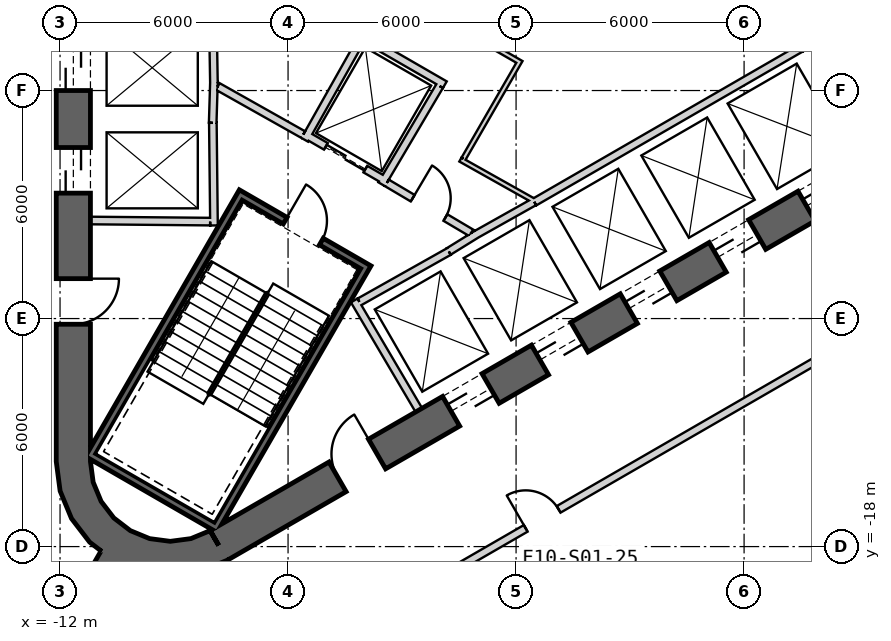
"""IFC4 building model, lengths in metres.
Left out: names, types, materials, properties, quantities, classifications, styles, units other than length and angle.
Written with IfcOpenShell. Run it as: python <this file> out.ifc"""

import sys

from ifc_helpers import new_model, si_unit, direction, frame, frame_2d, origin, place, context, subcontext, project, spatial, polyline, rectangle, outline, extrude, element, fill, save


model = new_model("IFC4")
c1 = context("Model", 3, precision=1e-05, world=origin(), true_north=direction((0.0, 1.0)))
c2 = subcontext(c1, "Body", "Model", "MODEL_VIEW")
j1 = project(units=[si_unit("LENGTHUNIT", "METRE"), si_unit("PLANEANGLEUNIT", "RADIAN")], contexts=[c1])
p1 = place(None, origin())
s1 = spatial("IfcSite", under=j1, at=p1, CompositionType="ELEMENT")
p2 = place(p1, origin())
s2 = spatial("IfcBuilding", under=s1, at=p2, CompositionType="ELEMENT")
p3 = place(p2, frame((0.0, 0.0, 57.8)))
s3 = spatial("IfcBuildingStorey", under=s2, at=p3, CompositionType="ELEMENT", Elevation=57.8)
p4 = place(p3, frame((-11.65, 15.762, 0.0), z_axis=(0.0, 0.0, 1.0), x_axis=(0.0, -1.0, 0.0)))
e1 = element("IfcWall", 1, at=p4, inside=s3, PredefinedType="SHEAR", context=c2, shape_type="SweptSolid", body=[
    extrude(rectangle(XDim=31.523, YDim=0.9, at=frame_2d((15.762, 0.0))), origin(), (0.0, 0.0, 1.0), 4.1),
])
p5 = place(p4, frame((7.062, 0.0, 0.0)))
e2 = element("IfcOpeningElement", 2, at=p5, cuts=e1, PredefinedType="OPENING", context=c2, shape_type="SweptSolid", body=[
    extrude(rectangle(XDim=1.2, YDim=2.4, at=frame_2d((0.6, 1.2))), frame((0.0, 0.46, 0.0), z_axis=(0.0, -1.0, 0.0), x_axis=(1.0, 0.0, 0.0)), (0.0, 0.0, 1.0), 0.92),
])
p6 = place(p4, frame((9.762, 0.0, 0.0)))
e3 = element("IfcOpeningElement", 3, at=p6, cuts=e1, PredefinedType="OPENING", context=c2, shape_type="SweptSolid", body=[
    extrude(rectangle(XDim=1.2, YDim=2.4, at=frame_2d((0.6, 1.2))), frame((0.0, 0.46, 0.0), z_axis=(0.0, -1.0, 0.0), x_axis=(1.0, 0.0, 0.0)), (0.0, 0.0, 1.0), 0.92),
])
p7 = place(p4, frame((12.462, 0.0, 0.0)))
e4 = element("IfcOpeningElement", 4, at=p7, cuts=e1, PredefinedType="OPENING", context=c2, shape_type="SweptSolid", body=[
    extrude(rectangle(XDim=1.2, YDim=2.4, at=frame_2d((0.6, 1.2))), frame((0.0, 0.46, 0.0), z_axis=(0.0, -1.0, 0.0), x_axis=(1.0, 0.0, 0.0)), (0.0, 0.0, 1.0), 0.92),
])
p8 = place(p4, frame((15.162, 0.0, 0.0)))
e5 = element("IfcOpeningElement", 5, at=p8, cuts=e1, PredefinedType="OPENING", context=c2, shape_type="SweptSolid", body=[
    extrude(rectangle(XDim=1.2, YDim=2.4, at=frame_2d((0.6, 1.2))), frame((0.0, 0.46, 0.0), z_axis=(0.0, -1.0, 0.0), x_axis=(1.0, 0.0, 0.0)), (0.0, 0.0, 1.0), 0.92),
])
p9 = place(p4, frame((17.862, 0.0, 0.0)))
e6 = element("IfcOpeningElement", 6, at=p9, cuts=e1, PredefinedType="OPENING", context=c2, shape_type="SweptSolid", body=[
    extrude(rectangle(XDim=1.2, YDim=2.4, at=frame_2d((0.6, 1.2))), frame((0.0, 0.46, 0.0), z_axis=(0.0, -1.0, 0.0), x_axis=(1.0, 0.0, 0.0)), (0.0, 0.0, 1.0), 0.92),
])
p10 = place(p4, frame((20.562, 0.0, 0.0)))
e7 = element("IfcOpeningElement", 7, at=p10, cuts=e1, PredefinedType="OPENING", context=c2, shape_type="SweptSolid", body=[
    extrude(rectangle(XDim=1.2, YDim=2.4, at=frame_2d((0.6, 1.2))), frame((0.0, 0.46, 0.0), z_axis=(0.0, -1.0, 0.0), x_axis=(1.0, 0.0, 0.0)), (0.0, 0.0, 1.0), 0.92),
])
p11 = place(p4, frame((23.262, 0.0, 0.0)))
e8 = element("IfcOpeningElement", 8, at=p11, cuts=e1, PredefinedType="OPENING", context=c2, shape_type="SweptSolid", body=[
    extrude(rectangle(XDim=1.2, YDim=2.4, at=frame_2d((0.6, 1.2))), frame((0.0, 0.46, 0.0), z_axis=(0.0, -1.0, 0.0), x_axis=(1.0, 0.0, 0.0)), (0.0, 0.0, 1.0), 0.92),
])
p12 = place(p4, frame((3.612, 0.0, 0.0)))
e9 = element("IfcOpeningElement", 9, at=p12, cuts=e1, PredefinedType="OPENING", context=c2, shape_type="SweptSolid", body=[
    extrude(rectangle(XDim=1.2, YDim=2.4, at=frame_2d((0.6, 1.2))), frame((0.0, 0.46, 0.0), z_axis=(0.0, -1.0, 0.0), x_axis=(1.0, 0.0, 0.0)), (0.0, 0.0, 1.0), 0.92),
])
p13 = place(p4, frame((26.712, 0.0, 0.0)))
e10 = element("IfcOpeningElement", 10, at=p13, cuts=e1, PredefinedType="OPENING", context=c2, shape_type="SweptSolid", body=[
    extrude(rectangle(XDim=1.2, YDim=2.4, at=frame_2d((0.6, 1.2))), frame((0.0, 0.46, 0.0), z_axis=(0.0, -1.0, 0.0), x_axis=(1.0, 0.0, 0.0)), (0.0, 0.0, 1.0), 0.92),
])
p14 = place(p3, frame((-7.825, -17.97, 0.0), z_axis=(0.0, 0.0, 1.0), x_axis=(0.866028369851, 0.499994862586, 0.0)))
e11 = element("IfcWall", 11, at=p14, inside=s3, PredefinedType="SHEAR", context=c2, shape_type="SweptSolid", body=[
    extrude(rectangle(XDim=31.523, YDim=0.9, at=frame_2d((15.762, 0.0))), origin(), (0.0, 0.0, 1.0), 4.1),
])
p15 = place(p14, frame((7.062, 0.0, 0.0)))
e12 = element("IfcOpeningElement", 12, at=p15, cuts=e11, PredefinedType="OPENING", context=c2, shape_type="SweptSolid", body=[
    extrude(rectangle(XDim=1.2, YDim=2.4, at=frame_2d((0.6, 1.2))), frame((0.0, 0.46, 0.0), z_axis=(0.0, -1.0, 0.0), x_axis=(1.0, 0.0, 0.0)), (0.0, 0.0, 1.0), 0.92),
])
p16 = place(p14, frame((9.762, 0.0, 0.0)))
e13 = element("IfcOpeningElement", 13, at=p16, cuts=e11, PredefinedType="OPENING", context=c2, shape_type="SweptSolid", body=[
    extrude(rectangle(XDim=1.2, YDim=2.4, at=frame_2d((0.6, 1.2))), frame((0.0, 0.46, 0.0), z_axis=(0.0, -1.0, 0.0), x_axis=(1.0, 0.0, 0.0)), (0.0, 0.0, 1.0), 0.92),
])
p17 = place(p14, frame((12.462, 0.0, 0.0)))
e14 = element("IfcOpeningElement", 14, at=p17, cuts=e11, PredefinedType="OPENING", context=c2, shape_type="SweptSolid", body=[
    extrude(rectangle(XDim=1.2, YDim=2.4, at=frame_2d((0.6, 1.2))), frame((0.0, 0.46, 0.0), z_axis=(0.0, -1.0, 0.0), x_axis=(1.0, 0.0, 0.0)), (0.0, 0.0, 1.0), 0.92),
])
p18 = place(p14, frame((15.162, 0.0, 0.0)))
e15 = element("IfcOpeningElement", 15, at=p18, cuts=e11, PredefinedType="OPENING", context=c2, shape_type="SweptSolid", body=[
    extrude(rectangle(XDim=1.2, YDim=2.4, at=frame_2d((0.6, 1.2))), frame((0.0, 0.46, 0.0), z_axis=(0.0, -1.0, 0.0), x_axis=(1.0, 0.0, 0.0)), (0.0, 0.0, 1.0), 0.92),
])
p19 = place(p14, frame((17.862, 0.0, 0.0)))
e16 = element("IfcOpeningElement", 16, at=p19, cuts=e11, PredefinedType="OPENING", context=c2, shape_type="SweptSolid", body=[
    extrude(rectangle(XDim=1.2, YDim=2.4, at=frame_2d((0.6, 1.2))), frame((0.0, 0.46, 0.0), z_axis=(0.0, -1.0, 0.0), x_axis=(1.0, 0.0, 0.0)), (0.0, 0.0, 1.0), 0.92),
])
p20 = place(p14, frame((20.562, 0.0, 0.0)))
e17 = element("IfcOpeningElement", 17, at=p20, cuts=e11, PredefinedType="OPENING", context=c2, shape_type="SweptSolid", body=[
    extrude(rectangle(XDim=1.2, YDim=2.4, at=frame_2d((0.6, 1.2))), frame((0.0, 0.46, 0.0), z_axis=(0.0, -1.0, 0.0), x_axis=(1.0, 0.0, 0.0)), (0.0, 0.0, 1.0), 0.92),
])
p21 = place(p14, frame((26.712, 0.0, 0.0)))
e18 = element("IfcOpeningElement", 18, at=p21, cuts=e11, PredefinedType="OPENING", context=c2, shape_type="SweptSolid", body=[
    extrude(rectangle(XDim=1.2, YDim=2.4, at=frame_2d((0.6, 1.2))), frame((0.0, 0.46, 0.0), z_axis=(0.0, -1.0, 0.0), x_axis=(1.0, 0.0, 0.0)), (0.0, 0.0, 1.0), 0.92),
])
p22 = place(p14, frame((3.612, 0.0, 0.0)))
e19 = element("IfcOpeningElement", 19, at=p22, cuts=e11, PredefinedType="OPENING", context=c2, shape_type="SweptSolid", body=[
    extrude(rectangle(XDim=1.2, YDim=2.4, at=frame_2d((0.6, 1.2))), frame((0.0, 0.46, 0.0), z_axis=(0.0, -1.0, 0.0), x_axis=(1.0, 0.0, 0.0)), (0.0, 0.0, 1.0), 0.92),
])
p23 = place(p3, origin())
e20 = element("IfcWall", 20, at=p23, inside=s3, PredefinedType="SHEAR", context=c2, shape_type="SweptSolid", body=[
    extrude(outline(polyline([(-12.1, -15.762), (-11.998, -16.538), (-11.698, -17.262), (-11.221, -17.883), (-10.6, -18.36), (-9.876, -18.659), (-9.1, -18.762), (-8.323, -18.659), (-7.6, -18.36), (-8.05, -17.58), (-8.556, -17.79), (-9.1, -17.862), (-9.644, -17.79), (-10.15, -17.58), (-10.585, -17.247), (-10.919, -16.812), (-11.128, -16.305), (-11.2, -15.762), (-12.1, -15.762)])), origin(), (0.0, 0.0, 1.0), 4.1),
])
p24 = place(p3, frame((-10.575, -18.316, 0.0), z_axis=(0.0, 0.0, 1.0), x_axis=(-0.500001010139, -0.866024820579, 0.0)))
e21 = element("IfcWall", 21, at=p24, inside=s3, PredefinedType="SHEAR", context=c2, shape_type="SweptSolid", body=[
    extrude(rectangle(XDim=13.884, YDim=0.8, at=frame_2d((6.942, 0.0))), origin(), (0.0, 0.0, 1.0), 4.1),
])
p25 = place(p24, frame((1.2, 0.0, 0.0)))
e22 = element("IfcOpeningElement", 22, at=p25, cuts=e21, PredefinedType="OPENING", context=c2, shape_type="SweptSolid", body=[
    extrude(rectangle(XDim=1.4, YDim=2.4, at=frame_2d((0.7, 1.2))), frame((0.0, 0.41, 0.0), z_axis=(0.0, -1.0, 0.0), x_axis=(1.0, 0.0, 0.0)), (0.0, 0.0, 1.0), 0.82),
])
p26 = place(p3, frame((-7.95, -5.772, 0.0), z_axis=(0.0, 0.0, 1.0), x_axis=(-0.030803413295, -0.999525462272, 0.0)))
e23 = element("IfcWall", 23, at=p26, inside=s3, PredefinedType="PLUMBINGWALL", context=c2, shape_type="SweptSolid", body=[
    extrude(rectangle(XDim=1.078, YDim=0.2, at=frame_2d((0.539, 0.0))), origin(), (0.0, 0.0, 1.0), 3.8),
])
p27 = place(p3, frame((-7.98, -4.05, 0.0), z_axis=(0.0, 0.0, 1.0), x_axis=(0.016809909365, -0.999858703491, 0.0)))
e24 = element("IfcWall", 24, at=p27, inside=s3, PredefinedType="PLUMBINGWALL", context=c2, shape_type="SweptSolid", body=[
    extrude(rectangle(XDim=1.844, YDim=0.2, at=frame_2d((0.922, 0.0))), origin(), (0.0, 0.0, 1.0), 3.8),
])
p28 = place(p3, frame((-7.979, -6.85, 0.0), z_axis=(0.0, 0.0, 1.0), x_axis=(0.011121475088, -0.999938154483, 0.0)))
e25 = element("IfcWall", 25, at=p28, inside=s3, PredefinedType="PLUMBINGWALL", context=c2, shape_type="SweptSolid", body=[
    extrude(rectangle(XDim=2.7, YDim=0.2, at=frame_2d((1.35, 0.0))), origin(), (0.0, 0.0, 1.0), 3.8),
])
p29 = place(p3, frame((-8.05, -9.449, 0.0), z_axis=(0.0, 0.0, 1.0), x_axis=(-0.999957467379, 0.009222983926, 0.0)))
e26 = element("IfcWall", 26, at=p29, inside=s3, PredefinedType="PLUMBINGWALL", context=c2, shape_type="SweptSolid", body=[
    extrude(rectangle(XDim=3.15, YDim=0.2, at=frame_2d((1.575, 0.0))), origin(), (0.0, 0.0, 1.0), 3.8),
])
p30 = place(p3, frame((0.483, -8.936, 0.0), z_axis=(0.0, 0.0, 1.0), x_axis=(0.866030989016, 0.499990325971, 0.0)))
e27 = element("IfcWall", 27, at=p30, inside=s3, PredefinedType="PLUMBINGWALL", context=c2, shape_type="SweptSolid", body=[
    extrude(rectangle(XDim=8.1, YDim=0.2, at=frame_2d((4.05, 0.0))), origin(), (0.0, 0.0, 1.0), 3.8),
])
p31 = place(p3, frame((-2.558, -14.409, 0.0), z_axis=(0.0, 0.0, 1.0), x_axis=(-0.507997497166, 0.861358544901, 0.0)))
e28 = element("IfcWall", 28, at=p31, inside=s3, PredefinedType="PLUMBINGWALL", context=c2, shape_type="SweptSolid", body=[
    extrude(rectangle(XDim=3.35, YDim=0.2, at=frame_2d((1.675, 0.0))), origin(), (0.0, 0.0, 1.0), 3.8),
])
p32 = place(p3, frame((-1.769, -10.237, 0.0), z_axis=(0.0, 0.0, 1.0), x_axis=(-0.871534483978, -0.490334215854, 0.0)))
e29 = element("IfcWall", 29, at=p32, inside=s3, PredefinedType="PLUMBINGWALL", context=c2, shape_type="SweptSolid", body=[
    extrude(rectangle(XDim=2.7, YDim=0.2, at=frame_2d((1.35, 0.0))), origin(), (0.0, 0.0, 1.0), 3.8),
])
p33 = place(p3, frame((-1.024, -9.771, 0.0), z_axis=(0.0, 0.0, 1.0), x_axis=(-0.850348075135, -0.526220629693, 0.0)))
e30 = element("IfcWall", 30, at=p33, inside=s3, PredefinedType="PLUMBINGWALL", context=c2, shape_type="SweptSolid", body=[
    extrude(rectangle(XDim=0.878, YDim=0.2, at=frame_2d((0.439, 0.0))), origin(), (0.0, 0.0, 1.0), 3.8),
])
p34 = place(p3, frame((-1.13, -9.832, 0.0), z_axis=(0.0, 0.0, 1.0), x_axis=(0.871988740738, 0.489525929882, 0.0)))
e31 = element("IfcWall", 31, at=p34, inside=s3, PredefinedType="PLUMBINGWALL", context=c2, shape_type="SweptSolid", body=[
    extrude(rectangle(XDim=1.845, YDim=0.2, at=frame_2d((0.922, 0.0))), origin(), (0.0, 0.0, 1.0), 3.8),
])
p35 = place(p3, frame((-3.905, -10.563, -0.3), z_axis=(0.0, 0.0, 1.0), x_axis=(-0.500012932018, -0.866017937352, 0.0)))
e32 = element("IfcWall", 32, at=p35, inside=s3, PredefinedType="SHEAR", context=c2, shape_type="SweptSolid", body=[
    extrude(rectangle(XDim=8.1, YDim=0.2, at=frame_2d((4.05, 0.0))), origin(), (0.0, 0.0, 1.0), 4.1),
])
p36 = place(p3, frame((-11.282, -15.541, -0.3), z_axis=(0.0, 0.0, 1.0), x_axis=(0.866000483506, -0.500043160704, 0.0)))
e33 = element("IfcWall", 33, at=p36, inside=s3, PredefinedType="SHEAR", context=c2, shape_type="SweptSolid", body=[
    extrude(rectangle(XDim=3.8, YDim=0.2, at=frame_2d((1.9, 0.0))), origin(), (0.0, 0.0, 1.0), 4.1),
])
p37 = place(p3, frame((-7.196, -8.663, -0.3), z_axis=(0.0, 0.0, 1.0), x_axis=(-0.499997992926, -0.866026562566, 0.0)))
e34 = element("IfcWall", 34, at=p37, inside=s3, PredefinedType="SHEAR", context=c2, shape_type="SweptSolid", body=[
    extrude(rectangle(XDim=7.9, YDim=0.2, at=frame_2d((3.95, 0.0))), origin(), (0.0, 0.0, 1.0), 4.1),
])
p38 = place(p3, frame((-4.041, -10.599, -0.3), z_axis=(0.0, 0.0, 1.0), x_axis=(-0.866047807691, 0.499961193289, 0.0)))
e35 = element("IfcWall", 35, at=p38, inside=s3, PredefinedType="SHEAR", context=c2, shape_type="SweptSolid", body=[
    extrude(rectangle(XDim=3.6, YDim=0.2, at=frame_2d((1.8, 0.0))), origin(), (0.0, 0.0, 1.0), 4.1),
])
p39 = place(p38, frame((1.25, 0.0, 0.3)))
e36 = element("IfcOpeningElement", 36, at=p39, cuts=e35, PredefinedType="OPENING", context=c2, shape_type="SweptSolid", body=[
    extrude(rectangle(XDim=1.1, YDim=2.1, at=frame_2d((0.55, 1.05))), frame((0.0, 0.11, 0.0), z_axis=(0.0, -1.0, 0.0), x_axis=(1.0, 0.0, 0.0)), (0.0, 0.0, 1.0), 0.22),
])
p40 = place(p3, frame((-3.446, -8.368, 0.0), z_axis=(0.0, 0.0, 1.0), x_axis=(-0.866024647952, 0.500001309137, 0.0)))
e37 = element("IfcWall", 37, at=p40, inside=s3, PredefinedType="PLUMBINGWALL", context=c2, shape_type="SweptSolid", body=[
    extrude(rectangle(XDim=2.4, YDim=0.2, at=frame_2d((1.2, 0.0))), origin(), (0.0, 0.0, 1.0), 3.8),
])
p41 = place(p40, frame((0.6, 0.0, 0.0)))
e38 = element("IfcOpeningElement", 38, at=p41, cuts=e37, PredefinedType="OPENING", context=c2, shape_type="SweptSolid", body=[
    extrude(rectangle(XDim=1.2, YDim=2.4, at=frame_2d((0.6, 1.2))), frame((0.0, 0.11, 0.0), z_axis=(0.0, -1.0, 0.0), x_axis=(1.0, 0.0, 0.0)), (0.0, 0.0, 1.0), 0.22),
])
p42 = place(p3, frame((-5.562, -7.296, 0.0), z_axis=(0.0, 0.0, 1.0), x_axis=(0.491322718731, 0.870977603649, 0.0)))
e39 = element("IfcWall", 39, at=p42, inside=s3, PredefinedType="PLUMBINGWALL", context=c2, shape_type="SweptSolid", body=[
    extrude(rectangle(XDim=3.1, YDim=0.2, at=frame_2d((1.55, 0.0))), origin(), (0.0, 0.0, 1.0), 3.8),
])
p43 = place(p3, frame((-4.021, -4.606, 0.0), z_axis=(0.0, 0.0, 1.0), x_axis=(0.866016689309, -0.500015093611, 0.0)))
e40 = element("IfcWall", 40, at=p43, inside=s3, PredefinedType="PLUMBINGWALL", context=c2, shape_type="SweptSolid", body=[
    extrude(rectangle(XDim=2.479, YDim=0.2, at=frame_2d((1.24, 0.0))), origin(), (0.0, 0.0, 1.0), 3.8),
])
p44 = place(p3, frame((-2.012, -5.882, 0.0), z_axis=(0.0, 0.0, 1.0), x_axis=(-0.508619639323, -0.860991325447, 0.0)))
e41 = element("IfcWall", 41, at=p44, inside=s3, PredefinedType="PLUMBINGWALL", context=c2, shape_type="SweptSolid", body=[
    extrude(rectangle(XDim=3.0, YDim=0.2, at=frame_2d((1.5, 0.0))), origin(), (0.0, 0.0, 1.0), 3.8),
])
p45 = place(p3, frame((-7.849, -5.894, 0.0), z_axis=(0.0, 0.0, 1.0), x_axis=(0.871340486379, -0.490678873396, 0.0)))
e42 = element("IfcWall", 42, at=p45, inside=s3, PredefinedType="PARTITIONING", context=c2, shape_type="SweptSolid", body=[
    extrude(rectangle(XDim=2.581, YDim=0.2, at=frame_2d((1.291, 0.0))), origin(), (0.0, 0.0, 1.0), 3.8),
])
p46 = place(p3, frame((-3.401, -8.43, 0.0), z_axis=(0.0, 0.0, 1.0), x_axis=(0.860598681535, -0.509283721849, 0.0)))
e43 = element("IfcWall", 43, at=p46, inside=s3, PredefinedType="PARTITIONING", context=c2, shape_type="SweptSolid", body=[
    extrude(rectangle(XDim=2.581, YDim=0.2, at=frame_2d((1.291, 0.0))), origin(), (0.0, 0.0, 1.0), 3.8),
])
p47 = place(p46, frame((0.791, 0.0, 0.0)))
e44 = element("IfcOpeningElement", 44, at=p47, cuts=e43, PredefinedType="OPENING", context=c2, shape_type="SweptSolid", body=[
    extrude(rectangle(XDim=1.0, YDim=2.1, at=frame_2d((0.5, 1.05))), frame((0.0, 0.11, 0.0), z_axis=(0.0, -1.0, 0.0), x_axis=(1.0, 0.0, 0.0)), (0.0, 0.0, 1.0), 0.22),
])
p48 = place(p3, frame((-1.464, -7.816, 0.0), z_axis=(0.0, 0.0, 1.0), x_axis=(0.871880202732, -0.489719217597, 0.0)))
e45 = element("IfcWall", 45, at=p48, inside=s3, PredefinedType="PARTITIONING", context=c2, shape_type="SweptSolid", body=[
    extrude(rectangle(XDim=2.224, YDim=0.12, at=frame_2d((1.112, 0.0))), origin(), (0.0, 0.0, 1.0), 3.8),
])
p49 = place(p3, frame((0.118, -5.195, 0.0), z_axis=(0.0, 0.0, 1.0), x_axis=(-0.499990139034, -0.866031096941, 0.0)))
e46 = element("IfcWall", 46, at=p49, inside=s3, PredefinedType="PARTITIONING", context=c2, shape_type="SweptSolid", body=[
    extrude(rectangle(XDim=3.0, YDim=0.12, at=frame_2d((1.5, 0.0))), origin(), (0.0, 0.0, 1.0), 3.8),
])
p50 = place(p3, frame((-1.371, -4.405, 0.0), z_axis=(0.0, 0.0, 1.0), x_axis=(0.866053003207, -0.499952193351, 0.0)))
e47 = element("IfcWall", 47, at=p50, inside=s3, PredefinedType="PARTITIONING", context=c2, shape_type="SweptSolid", body=[
    extrude(rectangle(XDim=1.625, YDim=0.12, at=frame_2d((0.812, 0.0))), origin(), (0.0, 0.0, 1.0), 3.8),
])
p51 = place(p3, frame((-6.644, -21.503, 0.0), z_axis=(0.0, 0.0, 1.0), x_axis=(0.866025615729, 0.499999632902, 0.0)))
e48 = element("IfcWall", 48, at=p51, inside=s3, PredefinedType="PARTITIONING", context=c2, shape_type="SweptSolid", body=[
    extrude(rectangle(XDim=32.811, YDim=0.2, at=frame_2d((16.405, 0.0))), origin(), (0.0, 0.0, 1.0), 2.98),
])
p52 = place(p51, frame((24.32, 0.0, 0.0)))
e49 = element("IfcOpeningElement", 49, at=p52, cuts=e48, PredefinedType="OPENING", context=c2, shape_type="SweptSolid", body=[
    extrude(rectangle(XDim=1.0, YDim=2.1, at=frame_2d((0.5, 1.05))), frame((0.0, 0.11, 0.0), z_axis=(0.0, -1.0, 0.0), x_axis=(1.0, 0.0, 0.0)), (0.0, 0.0, 1.0), 0.22),
])
p53 = place(p51, frame((7.965, 0.0, 0.0)))
e50 = element("IfcOpeningElement", 50, at=p53, cuts=e48, PredefinedType="OPENING", context=c2, shape_type="SweptSolid", body=[
    extrude(rectangle(XDim=1.0, YDim=2.1, at=frame_2d((0.5, 1.05))), frame((0.0, 0.11, 0.0), z_axis=(0.0, -1.0, 0.0), x_axis=(1.0, 0.0, 0.0)), (0.0, 0.0, 1.0), 0.22),
])
p54 = place(p39, origin())
e51 = element("IfcDoor", 51, at=p54, inside=s3, OperationType="SINGLE_SWING_RIGHT", PredefinedType="USERDEFINED", context=c2, shape_type="SweptSolid", body=[
    extrude(rectangle(XDim=1.1, YDim=2.1, at=frame_2d((0.55, 1.05))), frame((0.0, 0.025, 0.0), z_axis=(0.0, -1.0, 0.0), x_axis=(1.0, 0.0, 0.0)), (0.0, 0.0, 1.0), 0.05),
])
fill(e36, e51)
p55 = place(p47, origin())
e52 = element("IfcDoor", 52, at=p55, inside=s3, OperationType="SINGLE_SWING_LEFT", PredefinedType="USERDEFINED", context=c2, shape_type="SweptSolid", body=[
    extrude(rectangle(XDim=1.0, YDim=2.1, at=frame_2d((0.5, 1.05))), frame((0.0, 0.025, 0.0), z_axis=(0.0, -1.0, 0.0), x_axis=(1.0, 0.0, 0.0)), (0.0, 0.0, 1.0), 0.05),
])
fill(e44, e52)
p56 = place(p41, origin())
e53 = element("IfcDoor", 53, at=p56, inside=s3, OperationType="SLIDING_TO_LEFT", PredefinedType="USERDEFINED", context=c2, shape_type="SweptSolid", body=[
    extrude(rectangle(XDim=1.2, YDim=2.4, at=frame_2d((0.6, 1.2))), frame((0.0, 0.025, 0.0), z_axis=(0.0, -1.0, 0.0), x_axis=(1.0, 0.0, 0.0)), (0.0, 0.0, 1.0), 0.05),
])
fill(e38, e53)
p57 = place(p53, origin())
e54 = element("IfcDoor", 54, at=p57, inside=s3, OperationType="SINGLE_SWING_LEFT", PredefinedType="USERDEFINED", context=c2, shape_type="SweptSolid", body=[
    extrude(rectangle(XDim=1.0, YDim=2.1, at=frame_2d((0.5, 1.05))), frame((0.0, 0.025, 0.0), z_axis=(0.0, -1.0, 0.0), x_axis=(1.0, 0.0, 0.0)), (0.0, 0.0, 1.0), 0.05),
])
fill(e50, e54)
p58 = place(p10, origin())
e55 = element("IfcDoor", 55, at=p58, inside=s3, OperationType="SLIDING_TO_LEFT", PredefinedType="USERDEFINED", context=c2, shape_type="SweptSolid", body=[
    extrude(rectangle(XDim=1.2, YDim=2.4, at=frame_2d((0.6, 1.2))), frame((0.0, 0.025, 0.0), z_axis=(0.0, -1.0, 0.0), x_axis=(1.0, 0.0, 0.0)), (0.0, 0.0, 1.0), 0.05),
])
fill(e7, e55)
p59 = place(p11, origin())
e56 = element("IfcDoor", 56, at=p59, inside=s3, OperationType="SLIDING_TO_LEFT", PredefinedType="USERDEFINED", context=c2, shape_type="SweptSolid", body=[
    extrude(rectangle(XDim=1.2, YDim=2.4, at=frame_2d((0.6, 1.2))), frame((0.0, 0.025, 0.0), z_axis=(0.0, -1.0, 0.0), x_axis=(1.0, 0.0, 0.0)), (0.0, 0.0, 1.0), 0.05),
])
fill(e8, e56)
p60 = place(p15, origin())
e57 = element("IfcDoor", 57, at=p60, inside=s3, OperationType="SLIDING_TO_LEFT", PredefinedType="USERDEFINED", context=c2, shape_type="SweptSolid", body=[
    extrude(rectangle(XDim=1.2, YDim=2.4, at=frame_2d((0.6, 1.2))), frame((0.0, 0.025, 0.0), z_axis=(0.0, -1.0, 0.0), x_axis=(1.0, 0.0, 0.0)), (0.0, 0.0, 1.0), 0.05),
])
fill(e12, e57)
p61 = place(p16, origin())
e58 = element("IfcDoor", 58, at=p61, inside=s3, OperationType="SLIDING_TO_LEFT", PredefinedType="USERDEFINED", context=c2, shape_type="SweptSolid", body=[
    extrude(rectangle(XDim=1.2, YDim=2.4, at=frame_2d((0.6, 1.2))), frame((0.0, 0.025, 0.0), z_axis=(0.0, -1.0, 0.0), x_axis=(1.0, 0.0, 0.0)), (0.0, 0.0, 1.0), 0.05),
])
fill(e13, e58)
p62 = place(p17, origin())
e59 = element("IfcDoor", 59, at=p62, inside=s3, OperationType="SLIDING_TO_LEFT", PredefinedType="USERDEFINED", context=c2, shape_type="SweptSolid", body=[
    extrude(rectangle(XDim=1.2, YDim=2.4, at=frame_2d((0.6, 1.2))), frame((0.0, 0.025, 0.0), z_axis=(0.0, -1.0, 0.0), x_axis=(1.0, 0.0, 0.0)), (0.0, 0.0, 1.0), 0.05),
])
fill(e14, e59)
p63 = place(p18, origin())
e60 = element("IfcDoor", 60, at=p63, inside=s3, OperationType="SLIDING_TO_LEFT", PredefinedType="USERDEFINED", context=c2, shape_type="SweptSolid", body=[
    extrude(rectangle(XDim=1.2, YDim=2.4, at=frame_2d((0.6, 1.2))), frame((0.0, 0.025, 0.0), z_axis=(0.0, -1.0, 0.0), x_axis=(1.0, 0.0, 0.0)), (0.0, 0.0, 1.0), 0.05),
])
fill(e15, e60)
p64 = place(p19, origin())
e61 = element("IfcDoor", 61, at=p64, inside=s3, OperationType="SLIDING_TO_LEFT", PredefinedType="USERDEFINED", context=c2, shape_type="SweptSolid", body=[
    extrude(rectangle(XDim=1.2, YDim=2.4, at=frame_2d((0.6, 1.2))), frame((0.0, 0.025, 0.0), z_axis=(0.0, -1.0, 0.0), x_axis=(1.0, 0.0, 0.0)), (0.0, 0.0, 1.0), 0.05),
])
fill(e16, e61)
p65 = place(p13, origin())
e62 = element("IfcDoor", 62, at=p65, inside=s3, OperationType="SINGLE_SWING_LEFT", PredefinedType="USERDEFINED", context=c2, shape_type="SweptSolid", body=[
    extrude(rectangle(XDim=1.2, YDim=2.4, at=frame_2d((0.6, 1.2))), frame((0.0, 0.025, 0.0), z_axis=(0.0, -1.0, 0.0), x_axis=(1.0, 0.0, 0.0)), (0.0, 0.0, 1.0), 0.05),
])
fill(e10, e62)
p66 = place(p22, origin())
e63 = element("IfcDoor", 63, at=p66, inside=s3, OperationType="SINGLE_SWING_LEFT", PredefinedType="USERDEFINED", context=c2, shape_type="SweptSolid", body=[
    extrude(rectangle(XDim=1.2, YDim=2.4, at=frame_2d((0.6, 1.2))), frame((0.0, 0.025, 0.0), z_axis=(0.0, -1.0, 0.0), x_axis=(1.0, 0.0, 0.0)), (0.0, 0.0, 1.0), 0.05),
])
fill(e19, e63)
save(model, sys.argv[1])
